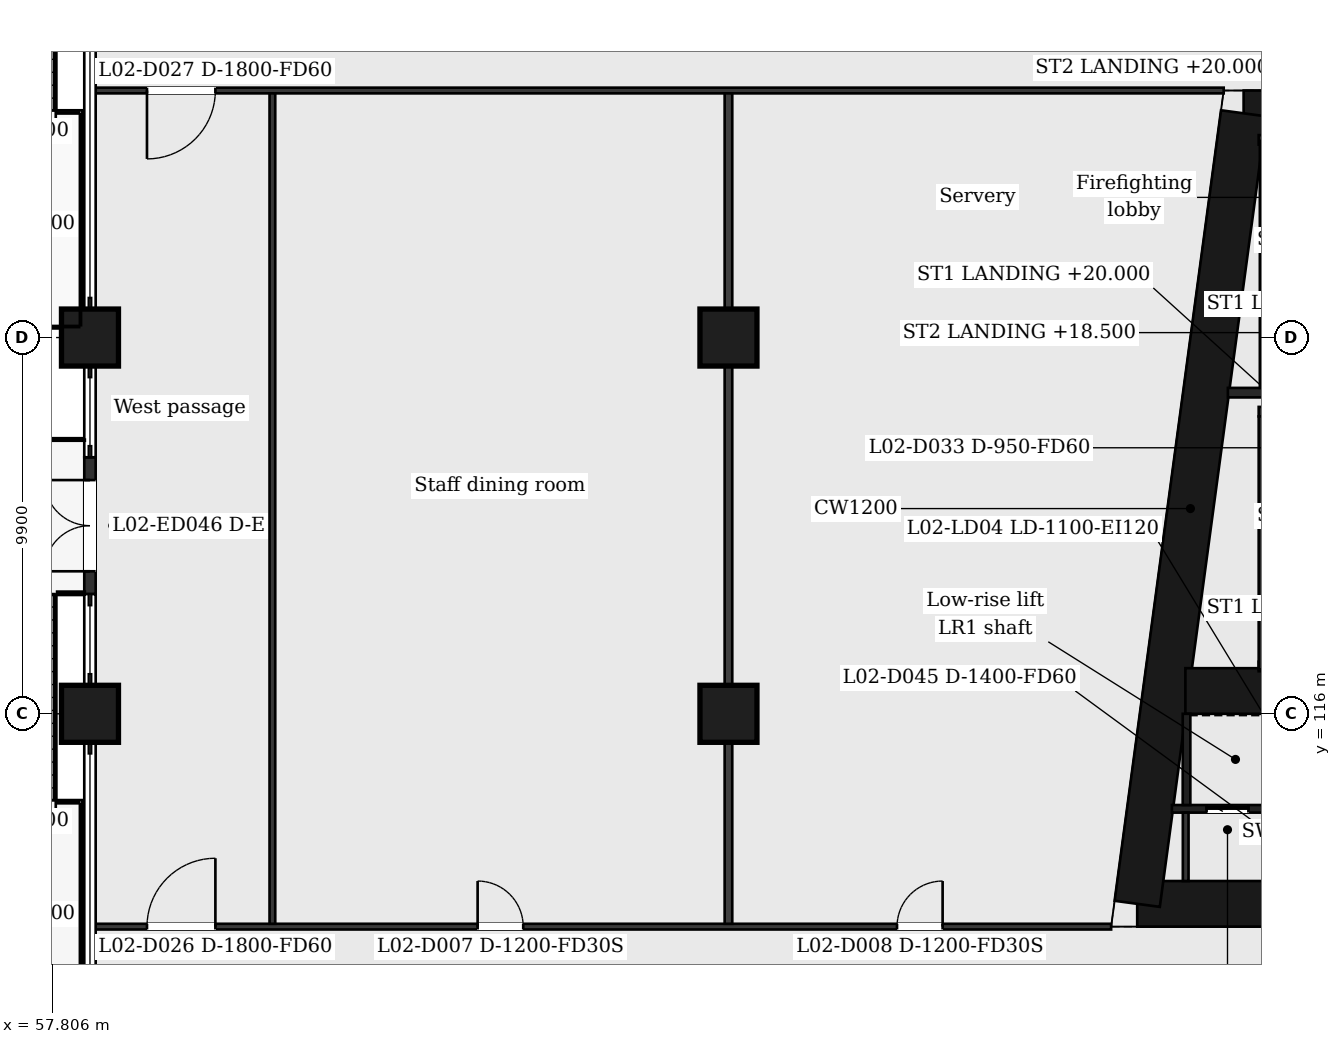
"""IFC4 building model, lengths in metres.
Left out: names, types, materials, properties, quantities, classifications, styles, units other than length and angle.
Written with IfcOpenShell. Run it as: python <this file> out.ifc"""

import sys

from ifc_helpers import new_model, si_unit, direction, frame, frame_2d, origin, origin_2d, place, context, subcontext, project, spatial, rectangle, extrude, element, fill, save


model = new_model("IFC4")
c1 = context("Model", 3, precision=1e-05, world=origin(), true_north=direction((0.0, 1.0)))
c2 = subcontext(c1, "Body", "Model", "MODEL_VIEW")
j1 = project(units=[si_unit("LENGTHUNIT", "METRE"), si_unit("PLANEANGLEUNIT", "RADIAN")], contexts=[c1])
p1 = place(None, origin())
s1 = spatial("IfcSite", under=j1, at=p1, CompositionType="ELEMENT")
p2 = place(p1, origin())
s2 = spatial("IfcBuilding", under=s1, at=p2, CompositionType="ELEMENT")
p3 = place(p2, frame((0.0, 0.0, 17.0)))
s3 = spatial("IfcBuildingStorey", under=s2, at=p3, CompositionType="ELEMENT", Elevation=17.0)
p4 = place(p3, frame((89.156, 131.8, 0.0), z_axis=(0.0, 0.0, 1.0), x_axis=(1.0, 0.0, 0.0)))
e1 = element("IfcWall", 1, at=p4, inside=s3, PredefinedType="SHEAR", context=c2, shape_type="SweptSolid", body=[
    extrude(rectangle(XDim=11.044, YDim=1.2, at=frame_2d((5.522, 0.0))), origin(), (0.0, 0.0, 1.0), 6.0),
])
p5 = place(p4, frame((6.458, 0.0, 0.0)))
e2 = element("IfcOpeningElement", 2, at=p5, cuts=e1, PredefinedType="OPENING", context=c2, shape_type="SweptSolid", body=[
    extrude(rectangle(XDim=1.2, YDim=2.1, at=frame_2d((0.6, 1.05))), frame((0.0, 0.61, 0.0), z_axis=(0.0, -1.0, 0.0), x_axis=(1.0, 0.0, 0.0)), (0.0, 0.0, 1.0), 1.22),
])
p6 = place(p3, frame((100.2, 111.0, 0.0), z_axis=(0.0, 0.0, 1.0), x_axis=(-1.0, 0.0, 0.0)))
e3 = element("IfcWall", 3, at=p6, inside=s3, PredefinedType="SHEAR", context=c2, shape_type="SweptSolid", body=[
    extrude(rectangle(XDim=13.844, YDim=1.2, at=frame_2d((6.922, 0.0))), origin(), (0.0, 0.0, 1.0), 6.0),
])
p7 = place(p6, frame((5.694, 0.0, 0.0)))
e4 = element("IfcOpeningElement", 4, at=p7, cuts=e3, PredefinedType="OPENING", context=c2, shape_type="SweptSolid", body=[
    extrude(rectangle(XDim=1.4, YDim=2.1, at=frame_2d((0.7, 1.05))), frame((0.0, 0.61, 0.0), z_axis=(0.0, -1.0, 0.0), x_axis=(1.0, 0.0, 0.0)), (0.0, 0.0, 1.0), 1.22),
])
p8 = place(p3, frame((86.355, 111.0, 0.0), z_axis=(0.0, 0.0, 1.0), x_axis=(0.133413989637, 0.99106039542, 0.0)))
e5 = element("IfcWall", 5, at=p8, inside=s3, PredefinedType="SHEAR", context=c2, shape_type="SweptSolid", body=[
    extrude(rectangle(XDim=20.988, YDim=1.2, at=frame_2d((10.494, 0.0))), origin(), (0.0, 0.0, 1.0), 6.0),
])
p9 = place(p3, frame((87.623, 116.6, 0.0), z_axis=(0.0, 0.0, 1.0), x_axis=(1.0, 0.0, 0.0)))
e6 = element("IfcWall", 6, at=p9, inside=s3, PredefinedType="SHEAR", context=c2, shape_type="SweptSolid", body=[
    extrude(rectangle(XDim=5.077, YDim=1.2, at=frame_2d((2.539, 0.0))), origin(), (0.0, 0.0, 1.0), 6.0),
])
for number, where, z_axis, x_axis in (
    (7, (58.8, 116.0, 0.0), (0.0, 0.0, 1.0), (1.0, 0.0, 0.0)),
    (8, (75.6, 116.0, 0.0), (0.0, 0.0, 1.0), (1.0, 0.0, 0.0)),
    (9, (58.8, 125.9, 0.0), (0.0, 0.0, 1.0), (1.0, 0.0, 0.0)),
    (10, (75.6, 125.9, 0.0), (0.0, 0.0, 1.0), (1.0, 0.0, 0.0)),
):
    element("IfcColumn", number, at=place(p3, frame(where, z_axis=z_axis, x_axis=x_axis)), inside=s3, PredefinedType="COLUMN", context=c2, shape_type="SweptSolid", body=[
        extrude(rectangle(XDim=1.5, YDim=1.5, at=origin_2d()), origin(), (0.0, 0.0, 1.0), 6.0),
    ])
p10 = place(p3, frame((58.8, 119.15, 0.0), z_axis=(0.0, 0.0, 1.0), x_axis=(0.0, 1.0, 0.0)))
e11 = element("IfcWall", 11, at=p10, inside=s3, PredefinedType="SOLIDWALL", context=c2, shape_type="SweptSolid", body=[
    extrude(rectangle(XDim=3.6, YDim=0.3, at=frame_2d((1.8, 0.0))), origin(), (0.0, 0.0, 1.0), 5.1),
])
p11 = place(p10, frame((0.6, 0.0, 0.0)))
e12 = element("IfcOpeningElement", 12, at=p11, cuts=e11, PredefinedType="OPENING", context=c2, shape_type="SweptSolid", body=[
    extrude(rectangle(XDim=2.4, YDim=2.4, at=frame_2d((1.2, 1.2))), frame((0.0, 0.16, 0.0), z_axis=(0.0, -1.0, 0.0), x_axis=(1.0, 0.0, 0.0)), (0.0, 0.0, 1.0), 0.32),
])
p12 = place(p3, frame((58.85, 110.4, 0.0), z_axis=(0.0, 0.0, 1.0), x_axis=(1.0, 0.0, 0.0)))
e13 = element("IfcWall", 13, at=p12, inside=s3, PredefinedType="PARTITIONING", context=c2, shape_type="SweptSolid", body=[
    extrude(rectangle(XDim=26.819, YDim=0.15, at=frame_2d((13.409, 0.0))), origin(), (0.0, 0.0, 1.0), 5.5),
])
p13 = place(p12, frame((10.15, 0.0, 0.0)))
e14 = element("IfcOpeningElement", 14, at=p13, cuts=e13, PredefinedType="OPENING", context=c2, shape_type="SweptSolid", body=[
    extrude(rectangle(XDim=1.2, YDim=2.1, at=frame_2d((0.6, 1.05))), frame((0.0, 0.085, 0.0), z_axis=(0.0, -1.0, 0.0), x_axis=(1.0, 0.0, 0.0)), (0.0, 0.0, 1.0), 0.17),
])
p14 = place(p12, frame((21.185, 0.0, 0.0)))
e15 = element("IfcOpeningElement", 15, at=p14, cuts=e13, PredefinedType="OPENING", context=c2, shape_type="SweptSolid", body=[
    extrude(rectangle(XDim=1.2, YDim=2.1, at=frame_2d((0.6, 1.05))), frame((0.0, 0.085, 0.0), z_axis=(0.0, -1.0, 0.0), x_axis=(1.0, 0.0, 0.0)), (0.0, 0.0, 1.0), 0.17),
])
p15 = place(p12, frame((1.45, 0.0, 0.0)))
e16 = element("IfcOpeningElement", 16, at=p15, cuts=e13, PredefinedType="OPENING", context=c2, shape_type="SweptSolid", body=[
    extrude(rectangle(XDim=1.8, YDim=2.1, at=frame_2d((0.9, 1.05))), frame((0.0, 0.085, 0.0), z_axis=(0.0, -1.0, 0.0), x_axis=(1.0, 0.0, 0.0)), (0.0, 0.0, 1.0), 0.17),
])
p16 = place(p3, frame((87.267, 113.5, 0.0), z_axis=(0.0, 0.0, 1.0), x_axis=(1.0, 0.0, 0.0)))
e17 = element("IfcWall", 17, at=p16, inside=s3, PredefinedType="PARTITIONING", context=c2, shape_type="SweptSolid", body=[
    extrude(rectangle(XDim=5.66, YDim=0.2, at=frame_2d((2.83, 0.0))), origin(), (0.0, 0.0, 1.0), 5.5),
])
p17 = place(p16, frame((0.914, 0.0, 0.0)))
e18 = element("IfcOpeningElement", 18, at=p17, cuts=e17, PredefinedType="OPENING", context=c2, shape_type="SweptSolid", body=[
    extrude(rectangle(XDim=1.1, YDim=2.1, at=frame_2d((0.55, 1.05))), frame((0.0, 0.11, 0.0), z_axis=(0.0, -1.0, 0.0), x_axis=(1.0, 0.0, 0.0)), (0.0, 0.0, 1.0), 0.22),
])
p18 = place(p16, frame((3.711, 0.0, 0.0)))
e19 = element("IfcOpeningElement", 19, at=p18, cuts=e17, PredefinedType="OPENING", context=c2, shape_type="SweptSolid", body=[
    extrude(rectangle(XDim=1.1, YDim=2.1, at=frame_2d((0.55, 1.05))), frame((0.0, 0.11, 0.0), z_axis=(0.0, -1.0, 0.0), x_axis=(1.0, 0.0, 0.0)), (0.0, 0.0, 1.0), 0.22),
])
for number, where, z_axis, x_axis in (
    (20, (89.552, 117.245, 0.0), (0.0, 0.0, 1.0), (1.0, 0.0, 0.0)),
    (21, (89.552, 123.95, 0.0), (0.0, 0.0, 1.0), (1.0, 0.0, 0.0)),
):
    element("IfcWall", number, at=place(p3, frame(where, z_axis=z_axis, x_axis=x_axis)), inside=s3, PredefinedType="PARTITIONING", context=c2, shape_type="SweptSolid", body=[
        extrude(rectangle(XDim=3.4, YDim=0.25, at=frame_2d((1.7, 0.0))), origin(), (0.0, 0.0, 1.0), 5.5),
    ])
p19 = place(p3, frame((88.741, 124.45, 0.0), z_axis=(0.0, 0.0, 1.0), x_axis=(1.0, 0.0, 0.0)))
e22 = element("IfcWall", 22, at=p19, inside=s3, PredefinedType="PARTITIONING", context=c2, shape_type="SweptSolid", body=[
    extrude(rectangle(XDim=4.21, YDim=0.25, at=frame_2d((2.105, 0.0))), origin(), (0.0, 0.0, 1.0), 5.5),
])
p20 = place(p3, frame((89.552, 131.101, 0.0), z_axis=(0.0, 0.0, 1.0), x_axis=(1.0, 0.0, 0.0)))
e23 = element("IfcWall", 23, at=p20, inside=s3, PredefinedType="PARTITIONING", context=c2, shape_type="SweptSolid", body=[
    extrude(rectangle(XDim=3.4, YDim=0.25, at=frame_2d((1.7, 0.0))), origin(), (0.0, 0.0, 1.0), 5.5),
])
p21 = place(p3, frame((58.85, 132.4, 0.0), z_axis=(0.0, 0.0, 1.0), x_axis=(1.0, 0.0, 0.0)))
e24 = element("IfcWall", 24, at=p21, inside=s3, PredefinedType="PARTITIONING", context=c2, shape_type="SweptSolid", body=[
    extrude(rectangle(XDim=29.781, YDim=0.15, at=frame_2d((14.891, 0.0))), origin(), (0.0, 0.0, 1.0), 5.5),
])
p22 = place(p21, frame((1.45, 0.0, 0.0)))
e25 = element("IfcOpeningElement", 25, at=p22, cuts=e24, PredefinedType="OPENING", context=c2, shape_type="SweptSolid", body=[
    extrude(rectangle(XDim=1.8, YDim=2.1, at=frame_2d((0.9, 1.05))), frame((0.0, 0.085, 0.0), z_axis=(0.0, -1.0, 0.0), x_axis=(1.0, 0.0, 0.0)), (0.0, 0.0, 1.0), 0.17),
])
p23 = place(p3, frame((63.6, 110.475, 0.0), z_axis=(0.0, 0.0, 1.0), x_axis=(0.0, 1.0, 0.0)))
e26 = element("IfcWall", 26, at=p23, inside=s3, PredefinedType="PARTITIONING", context=c2, shape_type="SweptSolid", body=[
    extrude(rectangle(XDim=21.85, YDim=0.15, at=frame_2d((10.925, 0.0))), origin(), (0.0, 0.0, 1.0), 5.5),
])
p24 = place(p3, frame((75.6, 110.475, 0.0), z_axis=(0.0, 0.0, 1.0), x_axis=(0.0, 1.0, 0.0)))
e27 = element("IfcWall", 27, at=p24, inside=s3, PredefinedType="PARTITIONING", context=c2, shape_type="SweptSolid", body=[
    extrude(rectangle(XDim=21.85, YDim=0.2, at=frame_2d((10.925, 0.0))), origin(), (0.0, 0.0, 1.0), 5.5),
])
p25 = place(p3, frame((87.653, 113.6, 0.0), z_axis=(0.0, 0.0, 1.0), x_axis=(0.0, 1.0, 0.0)))
e28 = element("IfcWall", 28, at=p25, inside=s3, PredefinedType="PARTITIONING", context=c2, shape_type="SweptSolid", body=[
    extrude(rectangle(XDim=2.4, YDim=0.2, at=frame_2d((1.2, 0.0))), origin(), (0.0, 0.0, 1.0), 5.5),
])
p26 = place(p3, frame((87.631, 111.6, 0.0), z_axis=(0.0, 0.0, 1.0), x_axis=(0.0, 1.0, 0.0)))
e29 = element("IfcWall", 29, at=p26, inside=s3, PredefinedType="PARTITIONING", context=c2, shape_type="SweptSolid", body=[
    extrude(rectangle(XDim=1.8, YDim=0.15, at=frame_2d((0.9, 0.0))), origin(), (0.0, 0.0, 1.0), 5.5),
])
p27 = place(p3, frame((89.677, 117.17, 0.0), z_axis=(0.0, 0.0, 1.0), x_axis=(0.0, 1.0, 0.0)))
e30 = element("IfcWall", 30, at=p27, inside=s3, PredefinedType="PARTITIONING", context=c2, shape_type="SweptSolid", body=[
    extrude(rectangle(XDim=6.655, YDim=0.25, at=frame_2d((3.328, 0.0))), origin(), (0.0, 0.0, 1.0), 5.5),
])
p28 = place(p3, frame((89.707, 124.575, 0.0), z_axis=(0.0, 0.0, 1.0), x_axis=(0.0, 1.0, 0.0)))
e31 = element("IfcWall", 31, at=p28, inside=s3, PredefinedType="PARTITIONING", context=c2, shape_type="SweptSolid", body=[
    extrude(rectangle(XDim=6.5, YDim=0.25, at=frame_2d((3.25, 0.0))), origin(), (0.0, 0.0, 1.0), 5.5),
])
p29 = place(p11, origin())
e32 = element("IfcDoor", 32, at=p29, inside=s3, OperationType="DOUBLE_DOOR_DOUBLE_SWING", PredefinedType="DOOR", context=c2, shape_type="SweptSolid", body=[
    extrude(rectangle(XDim=2.4, YDim=2.4, at=frame_2d((1.2, 1.2))), frame((0.0, 0.025, 0.0), z_axis=(0.0, -1.0, 0.0), x_axis=(1.0, 0.0, 0.0)), (0.0, 0.0, 1.0), 0.05),
])
fill(e12, e32)
p30 = place(p13, origin())
e33 = element("IfcDoor", 33, at=p30, inside=s3, OperationType="SINGLE_SWING_LEFT", PredefinedType="DOOR", context=c2, shape_type="SweptSolid", body=[
    extrude(rectangle(XDim=1.2, YDim=2.1, at=frame_2d((0.6, 1.05))), frame((0.0, 0.025, 0.0), z_axis=(0.0, -1.0, 0.0), x_axis=(1.0, 0.0, 0.0)), (0.0, 0.0, 1.0), 0.05),
])
fill(e14, e33)
p31 = place(p14, origin())
e34 = element("IfcDoor", 34, at=p31, inside=s3, OperationType="SINGLE_SWING_RIGHT", PredefinedType="DOOR", context=c2, shape_type="SweptSolid", body=[
    extrude(rectangle(XDim=1.2, YDim=2.1, at=frame_2d((0.6, 1.05))), frame((0.0, 0.025, 0.0), z_axis=(0.0, -1.0, 0.0), x_axis=(1.0, 0.0, 0.0)), (0.0, 0.0, 1.0), 0.05),
])
fill(e15, e34)
p32 = place(p15, origin())
e35 = element("IfcDoor", 35, at=p32, inside=s3, OperationType="SINGLE_SWING_RIGHT", PredefinedType="DOOR", context=c2, shape_type="SweptSolid", body=[
    extrude(rectangle(XDim=1.8, YDim=2.1, at=frame_2d((0.9, 1.05))), frame((0.0, 0.025, 0.0), z_axis=(0.0, -1.0, 0.0), x_axis=(1.0, 0.0, 0.0)), (0.0, 0.0, 1.0), 0.05),
])
fill(e16, e35)
p33 = place(p22, origin())
e36 = element("IfcDoor", 36, at=p33, inside=s3, OperationType="SINGLE_SWING_LEFT", PredefinedType="DOOR", context=c2, shape_type="SweptSolid", body=[
    extrude(rectangle(XDim=1.8, YDim=2.1, at=frame_2d((0.9, 1.05))), frame((0.0, 0.025, 0.0), z_axis=(0.0, -1.0, 0.0), x_axis=(1.0, 0.0, 0.0)), (0.0, 0.0, 1.0), 0.05),
])
fill(e25, e36)
p34 = place(p17, origin())
e37 = element("IfcDoor", 37, at=p34, inside=s3, OperationType="SLIDING_TO_LEFT", PredefinedType="DOOR", context=c2, shape_type="SweptSolid", body=[
    extrude(rectangle(XDim=1.1, YDim=2.1, at=frame_2d((0.55, 1.05))), frame((0.0, 0.025, 0.0), z_axis=(0.0, -1.0, 0.0), x_axis=(1.0, 0.0, 0.0)), (0.0, 0.0, 1.0), 0.05),
])
fill(e18, e37)
save(model, sys.argv[1])
